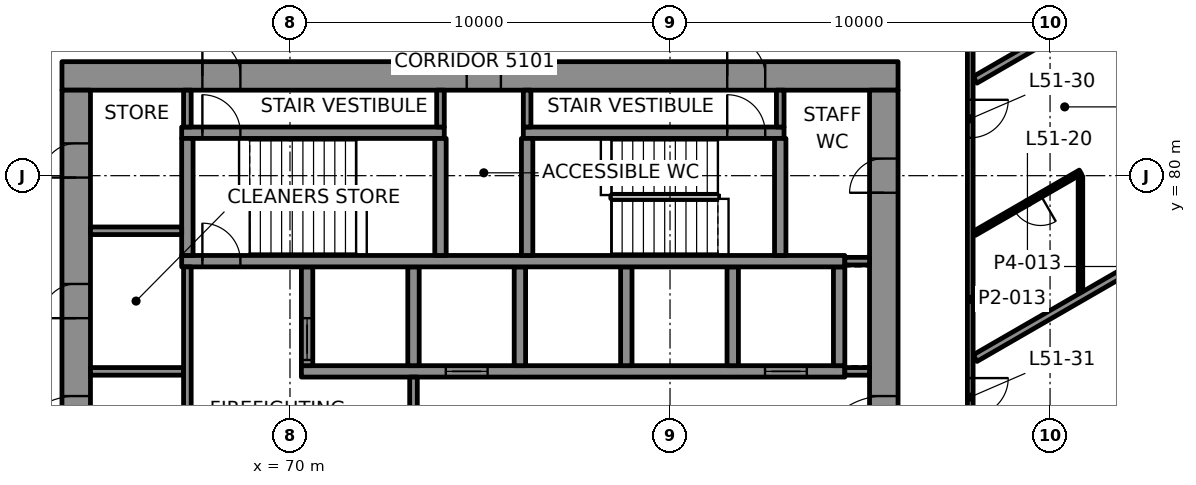
"""IFC4 building model, lengths in metres.
Left out: names, types, materials, properties, quantities, classifications, styles, units other than length and angle.
Written with IfcOpenShell. Run it as: python <this file> out.ifc"""

import sys

from ifc_helpers import new_model, si_unit, direction, frame, frame_2d, origin, place, context, subcontext, project, spatial, rectangle, extrude, element, fill, save


model = new_model("IFC4")
c1 = context("Model", 3, precision=1e-05, world=origin(), true_north=direction((0.0, 1.0)))
c2 = subcontext(c1, "Body", "Model", "MODEL_VIEW")
j1 = project(units=[si_unit("LENGTHUNIT", "METRE"), si_unit("PLANEANGLEUNIT", "RADIAN")], contexts=[c1])
p1 = place(None, origin())
s1 = spatial("IfcSite", under=j1, at=p1, CompositionType="ELEMENT")
p2 = place(p1, origin())
s2 = spatial("IfcBuilding", under=s1, at=p2, CompositionType="ELEMENT")
p3 = place(p2, frame((0.0, 0.0, 218.2)))
s3 = spatial("IfcBuildingStorey", under=s2, at=p3, CompositionType="ELEMENT", Elevation=218.2)
p4 = place(p3, frame((64.0, 82.625, 0.0), z_axis=(0.0, 0.0, 1.0), x_axis=(1.0, 0.0, 0.0)))
e1 = element("IfcWall", 1, at=p4, inside=s3, PredefinedType="SHEAR", context=c2, shape_type="SweptSolid", body=[
    extrude(rectangle(XDim=22.0, YDim=0.75, at=frame_2d((11.0, 0.0))), origin(), (0.0, 0.0, 1.0), 3.7),
])
p5 = place(p4, frame((3.695, 0.0, 0.0)))
e2 = element("IfcOpeningElement", 2, at=p5, cuts=e1, PredefinedType="OPENING", context=c2, shape_type="SweptSolid", body=[
    extrude(rectangle(XDim=1.0, YDim=2.1, at=frame_2d((0.5, 1.05))), frame((0.0, 0.385, 0.0), z_axis=(0.0, -1.0, 0.0), x_axis=(1.0, 0.0, 0.0)), (0.0, 0.0, 1.0), 0.77),
])
p6 = place(p4, frame((17.505, 0.0, 0.0)))
e3 = element("IfcOpeningElement", 3, at=p6, cuts=e1, PredefinedType="OPENING", context=c2, shape_type="SweptSolid", body=[
    extrude(rectangle(XDim=1.0, YDim=2.1, at=frame_2d((0.5, 1.05))), frame((0.0, 0.385, 0.0), z_axis=(0.0, -1.0, 0.0), x_axis=(1.0, 0.0, 0.0)), (0.0, 0.0, 1.0), 0.77),
])
p7 = place(p4, frame((10.65, 0.0, 0.0)))
e4 = element("IfcOpeningElement", 4, at=p7, cuts=e1, PredefinedType="OPENING", context=c2, shape_type="SweptSolid", body=[
    extrude(rectangle(XDim=0.9, YDim=2.1, at=frame_2d((0.45, 1.05))), frame((0.0, 0.385, 0.0), z_axis=(0.0, -1.0, 0.0), x_axis=(1.0, 0.0, 0.0)), (0.0, 0.0, 1.0), 0.77),
])
p8 = place(p3, frame((64.375, 67.75, 0.0), z_axis=(0.0, 0.0, 1.0), x_axis=(0.0, 1.0, 0.0)))
e5 = element("IfcWall", 5, at=p8, inside=s3, PredefinedType="SHEAR", context=c2, shape_type="SweptSolid", body=[
    extrude(rectangle(XDim=14.5, YDim=0.75, at=frame_2d((7.25, 0.0))), origin(), (0.0, 0.0, 1.0), 3.7),
])
p9 = place(p8, frame((4.65, 0.0, 0.0)))
e6 = element("IfcOpeningElement", 6, at=p9, cuts=e5, PredefinedType="OPENING", context=c2, shape_type="SweptSolid", body=[
    extrude(rectangle(XDim=1.8, YDim=2.1, at=frame_2d((0.9, 1.05))), frame((0.0, 0.385, 0.0), z_axis=(0.0, -1.0, 0.0), x_axis=(1.0, 0.0, 0.0)), (0.0, 0.0, 1.0), 0.77),
])
p10 = place(p8, frame((8.5, 0.0, 0.0)))
e7 = element("IfcOpeningElement", 7, at=p10, cuts=e5, PredefinedType="OPENING", context=c2, shape_type="SweptSolid", body=[
    extrude(rectangle(XDim=0.9, YDim=2.1, at=frame_2d((0.45, 1.05))), frame((0.0, 0.385, 0.0), z_axis=(0.0, -1.0, 0.0), x_axis=(1.0, 0.0, 0.0)), (0.0, 0.0, 1.0), 0.77),
])
p11 = place(p8, frame((12.2, 0.0, 0.0)))
e8 = element("IfcOpeningElement", 8, at=p11, cuts=e5, PredefinedType="OPENING", context=c2, shape_type="SweptSolid", body=[
    extrude(rectangle(XDim=0.9, YDim=2.1, at=frame_2d((0.45, 1.05))), frame((0.0, 0.385, 0.0), z_axis=(0.0, -1.0, 0.0), x_axis=(1.0, 0.0, 0.0)), (0.0, 0.0, 1.0), 0.77),
])
p12 = place(p3, frame((85.625, 67.75, 0.0), z_axis=(0.0, 0.0, 1.0), x_axis=(0.0, 1.0, 0.0)))
e9 = element("IfcWall", 9, at=p12, inside=s3, PredefinedType="SHEAR", context=c2, shape_type="SweptSolid", body=[
    extrude(rectangle(XDim=14.5, YDim=0.75, at=frame_2d((7.25, 0.0))), origin(), (0.0, 0.0, 1.0), 3.7),
])
p13 = place(p12, frame((4.65, 0.0, 0.0)))
e10 = element("IfcOpeningElement", 10, at=p13, cuts=e9, PredefinedType="OPENING", context=c2, shape_type="SweptSolid", body=[
    extrude(rectangle(XDim=1.8, YDim=2.1, at=frame_2d((0.9, 1.05))), frame((0.0, 0.385, 0.0), z_axis=(0.0, -1.0, 0.0), x_axis=(1.0, 0.0, 0.0)), (0.0, 0.0, 1.0), 0.77),
])
p14 = place(p12, frame((11.8, 0.0, 0.0)))
e11 = element("IfcOpeningElement", 11, at=p14, cuts=e9, PredefinedType="OPENING", context=c2, shape_type="SweptSolid", body=[
    extrude(rectangle(XDim=0.9, YDim=2.1, at=frame_2d((0.45, 1.05))), frame((0.0, 0.385, 0.0), z_axis=(0.0, -1.0, 0.0), x_axis=(1.0, 0.0, 0.0)), (0.0, 0.0, 1.0), 0.77),
])
p15 = place(p3, frame((70.3, 74.85, 0.0), z_axis=(0.0, 0.0, 1.0), x_axis=(1.0, 0.0, 0.0)))
e12 = element("IfcWall", 12, at=p15, inside=s3, PredefinedType="SHEAR", context=c2, shape_type="SweptSolid", body=[
    extrude(rectangle(XDim=14.3, YDim=0.3, at=frame_2d((7.15, 0.0))), origin(), (0.0, 0.0, 1.0), 3.7),
])
p16 = place(p15, frame((3.8, 0.0, 0.0)))
e13 = element("IfcOpeningElement", 13, at=p16, cuts=e12, PredefinedType="OPENING", context=c2, shape_type="SweptSolid", body=[
    extrude(rectangle(XDim=1.1, YDim=2.1, at=frame_2d((0.55, 1.05))), frame((0.0, 0.16, 0.0), z_axis=(0.0, -1.0, 0.0), x_axis=(1.0, 0.0, 0.0)), (0.0, 0.0, 1.0), 0.32),
])
p17 = place(p15, frame((12.2, 0.0, 0.0)))
e14 = element("IfcOpeningElement", 14, at=p17, cuts=e12, PredefinedType="OPENING", context=c2, shape_type="SweptSolid", body=[
    extrude(rectangle(XDim=1.1, YDim=2.1, at=frame_2d((0.55, 1.05))), frame((0.0, 0.16, 0.0), z_axis=(0.0, -1.0, 0.0), x_axis=(1.0, 0.0, 0.0)), (0.0, 0.0, 1.0), 0.32),
])
p18 = place(p3, frame((70.45, 75.0, 0.0), z_axis=(0.0, 0.0, 1.0), x_axis=(0.0, 1.0, 0.0)))
e15 = element("IfcWall", 15, at=p18, inside=s3, PredefinedType="SHEAR", context=c2, shape_type="SweptSolid", body=[
    extrude(rectangle(XDim=2.6, YDim=0.3, at=frame_2d((1.3, 0.0))), origin(), (0.0, 0.0, 1.0), 3.7),
])
p19 = place(p18, frame((0.15, 0.0, 0.0)))
e16 = element("IfcOpeningElement", 16, at=p19, cuts=e15, PredefinedType="OPENING", context=c2, shape_type="SweptSolid", body=[
    extrude(rectangle(XDim=1.1, YDim=2.1, at=frame_2d((0.55, 1.05))), frame((0.0, 0.16, 0.0), z_axis=(0.0, -1.0, 0.0), x_axis=(1.0, 0.0, 0.0)), (0.0, 0.0, 1.0), 0.32),
])
for number, where, z_axis, x_axis in (
    (17, (73.25, 75.0, 0.0), (0.0, 0.0, 1.0), (0.0, 1.0, 0.0)),
    (18, (76.05, 75.0, 0.0), (0.0, 0.0, 1.0), (0.0, 1.0, 0.0)),
    (19, (78.85, 75.0, 0.0), (0.0, 0.0, 1.0), (0.0, 1.0, 0.0)),
    (20, (81.65, 75.0, 0.0), (0.0, 0.0, 1.0), (0.0, 1.0, 0.0)),
    (21, (84.45, 75.0, 0.0), (0.0, 0.0, 1.0), (0.0, 1.0, 0.0)),
):
    element("IfcWall", number, at=place(p3, frame(where, z_axis=z_axis, x_axis=x_axis)), inside=s3, PredefinedType="SHEAR", context=c2, shape_type="SweptSolid", body=[
        extrude(rectangle(XDim=2.6, YDim=0.3, at=frame_2d((1.3, 0.0))), origin(), (0.0, 0.0, 1.0), 3.7),
    ])
p20 = place(p3, frame((67.15, 77.75, 0.0), z_axis=(0.0, 0.0, 1.0), x_axis=(1.0, 0.0, 0.0)))
e22 = element("IfcWall", 22, at=p20, inside=s3, PredefinedType="SHEAR", context=c2, shape_type="SweptSolid", body=[
    extrude(rectangle(XDim=17.45, YDim=0.3, at=frame_2d((8.725, 0.0))), origin(), (0.0, 0.0, 1.0), 3.7),
])
p21 = place(p20, frame((0.545, 0.0, 0.0)))
e23 = element("IfcOpeningElement", 23, at=p21, cuts=e22, PredefinedType="OPENING", context=c2, shape_type="SweptSolid", body=[
    extrude(rectangle(XDim=1.0, YDim=2.1, at=frame_2d((0.5, 1.05))), frame((0.0, 0.16, 0.0), z_axis=(0.0, -1.0, 0.0), x_axis=(1.0, 0.0, 0.0)), (0.0, 0.0, 1.0), 0.32),
])
p22 = place(p3, frame((67.15, 81.13, 0.0), z_axis=(0.0, 0.0, 1.0), x_axis=(1.0, 0.0, 0.0)))
e24 = element("IfcWall", 24, at=p22, inside=s3, PredefinedType="SHEAR", context=c2, shape_type="SweptSolid", body=[
    extrude(rectangle(XDim=6.91, YDim=0.3, at=frame_2d((3.455, 0.0))), origin(), (0.0, 0.0, 1.0), 3.7),
])
p23 = place(p22, frame((0.545, 0.0, 0.0)))
e25 = element("IfcOpeningElement", 25, at=p23, cuts=e24, PredefinedType="OPENING", context=c2, shape_type="SweptSolid", body=[
    extrude(rectangle(XDim=1.0, YDim=2.1, at=frame_2d((0.5, 1.05))), frame((0.0, 0.16, 0.0), z_axis=(0.0, -1.0, 0.0), x_axis=(1.0, 0.0, 0.0)), (0.0, 0.0, 1.0), 0.32),
])
p24 = place(p3, frame((76.14, 81.13, 0.0), z_axis=(0.0, 0.0, 1.0), x_axis=(1.0, 0.0, 0.0)))
e26 = element("IfcWall", 26, at=p24, inside=s3, PredefinedType="SHEAR", context=c2, shape_type="SweptSolid", body=[
    extrude(rectangle(XDim=6.86, YDim=0.3, at=frame_2d((3.43, 0.0))), origin(), (0.0, 0.0, 1.0), 3.7),
])
p25 = place(p24, frame((5.365, 0.0, 0.0)))
e27 = element("IfcOpeningElement", 27, at=p25, cuts=e26, PredefinedType="OPENING", context=c2, shape_type="SweptSolid", body=[
    extrude(rectangle(XDim=1.0, YDim=2.1, at=frame_2d((0.5, 1.05))), frame((0.0, 0.16, 0.0), z_axis=(0.0, -1.0, 0.0), x_axis=(1.0, 0.0, 0.0)), (0.0, 0.0, 1.0), 0.32),
])
for number, where, z_axis, x_axis in (
    (28, (67.3, 77.9, 0.0), (0.0, 0.0, 1.0), (0.0, 1.0, 0.0)),
    (29, (73.96, 77.9, 0.0), (0.0, 0.0, 1.0), (0.0, 1.0, 0.0)),
    (30, (76.24, 77.9, 0.0), (0.0, 0.0, 1.0), (0.0, 1.0, 0.0)),
    (31, (82.9, 77.9, 0.0), (0.0, 0.0, 1.0), (0.0, 1.0, 0.0)),
):
    element("IfcWall", number, at=place(p3, frame(where, z_axis=z_axis, x_axis=x_axis)), inside=s3, PredefinedType="SHEAR", context=c2, shape_type="SweptSolid", body=[
        extrude(rectangle(XDim=3.08, YDim=0.3, at=frame_2d((1.54, 0.0))), origin(), (0.0, 0.0, 1.0), 3.7),
    ])
p26 = place(p3, frame((88.027, 75.198, 0.0), z_axis=(0.0, 0.0, 1.0), x_axis=(0.866029625778, 0.499992687221, 0.0)))
e32 = element("IfcWall", 32, at=p26, inside=s3, PredefinedType="PARTITIONING", context=c2, shape_type="SweptSolid", body=[
    extrude(rectangle(XDim=7.481, YDim=0.2, at=frame_2d((3.741, 0.0))), origin(), (0.0, 0.0, 1.0), 3.022),
])
p27 = place(p3, frame((90.8, 80.095, 0.0), z_axis=(0.0, 0.0, 1.0), x_axis=(-0.866029130051, -0.499993545862, 0.0)))
e33 = element("IfcWall", 33, at=p27, inside=s3, PredefinedType="PARTITIONING", context=c2, shape_type="SweptSolid", body=[
    extrude(rectangle(XDim=3.222, YDim=0.12, at=frame_2d((1.611, 0.0))), origin(), (0.0, 0.0, 1.0), 3.1),
])
p28 = place(p27, frame((1.211, 0.0, 0.0)))
e34 = element("IfcOpeningElement", 34, at=p28, cuts=e33, PredefinedType="OPENING", context=c2, shape_type="SweptSolid", body=[
    extrude(rectangle(XDim=0.8, YDim=2.1, at=frame_2d((0.4, 1.05))), frame((0.0, 0.07, 0.0), z_axis=(0.0, -1.0, 0.0), x_axis=(1.0, 0.0, 0.0)), (0.0, 0.0, 1.0), 0.14),
])
p29 = place(p3, frame((88.027, 82.521, 0.0), z_axis=(0.0, 0.0, 1.0), x_axis=(0.866032292145, 0.49998806882, 0.0)))
e35 = element("IfcWall", 35, at=p29, inside=s3, PredefinedType="PARTITIONING", context=c2, shape_type="SweptSolid", body=[
    extrude(rectangle(XDim=2.36, YDim=0.2, at=frame_2d((1.18, 0.0))), origin(), (0.0, 0.0, 1.0), 3.1),
])
p30 = place(p3, frame((90.8, 76.955, 0.0), z_axis=(0.0, 0.0, 1.0), x_axis=(0.0, 1.0, 0.0)))
e36 = element("IfcWall", 36, at=p30, inside=s3, PredefinedType="PARTITIONING", context=c2, shape_type="SweptSolid", body=[
    extrude(rectangle(XDim=3.031, YDim=0.12, at=frame_2d((1.515, 0.0))), origin(), (0.0, 0.0, 1.0), 3.1),
])
p31 = place(p3, frame((87.9, 84.9, 0.0), z_axis=(0.0, 0.0, 1.0), x_axis=(0.0, -1.0, 0.0)))
e37 = element("IfcWall", 37, at=p31, inside=s3, PredefinedType="PARTITIONING", context=c2, shape_type="SweptSolid", body=[
    extrude(rectangle(XDim=16.309, YDim=0.15, at=frame_2d((8.154, 0.0))), origin(), (0.0, 0.0, 1.0), 3.1),
])
p32 = place(p31, frame((2.904, 0.0, 0.0)))
e38 = element("IfcOpeningElement", 38, at=p32, cuts=e37, PredefinedType="OPENING", context=c2, shape_type="SweptSolid", body=[
    extrude(rectangle(XDim=1.0, YDim=2.1, at=frame_2d((0.5, 1.05))), frame((0.0, 0.085, 0.0), z_axis=(0.0, -1.0, 0.0), x_axis=(1.0, 0.0, 0.0)), (0.0, 0.0, 1.0), 0.17),
])
p33 = place(p31, frame((10.227, 0.0, 0.0)))
e39 = element("IfcOpeningElement", 39, at=p33, cuts=e37, PredefinedType="OPENING", context=c2, shape_type="SweptSolid", body=[
    extrude(rectangle(XDim=1.0, YDim=2.1, at=frame_2d((0.5, 1.05))), frame((0.0, 0.085, 0.0), z_axis=(0.0, -1.0, 0.0), x_axis=(1.0, 0.0, 0.0)), (0.0, 0.0, 1.0), 0.17),
])
p34 = place(p3, frame((64.75, 74.85, 0.0), z_axis=(0.0, 0.0, 1.0), x_axis=(1.0, 0.0, 0.0)))
e40 = element("IfcWall", 40, at=p34, inside=s3, PredefinedType="PARTITIONING", context=c2, shape_type="SweptSolid", body=[
    extrude(rectangle(XDim=2.45, YDim=0.2, at=frame_2d((1.225, 0.0))), origin(), (0.0, 0.0, 1.0), 3.7),
])
for number, where, z_axis, x_axis in (
    (41, (84.6, 74.85, 0.0), (0.0, 0.0, 1.0), (1.0, 0.0, 0.0)),
    (42, (84.6, 77.75, 0.0), (0.0, 0.0, 1.0), (1.0, 0.0, 0.0)),
):
    element("IfcWall", number, at=place(p3, frame(where, z_axis=z_axis, x_axis=x_axis)), inside=s3, PredefinedType="PARTITIONING", context=c2, shape_type="SweptSolid", body=[
        extrude(rectangle(XDim=0.65, YDim=0.2, at=frame_2d((0.325, 0.0))), origin(), (0.0, 0.0, 1.0), 3.7),
    ])
p35 = place(p3, frame((64.75, 78.55, 0.0), z_axis=(0.0, 0.0, 1.0), x_axis=(1.0, 0.0, 0.0)))
e43 = element("IfcWall", 43, at=p35, inside=s3, PredefinedType="PARTITIONING", context=c2, shape_type="SweptSolid", body=[
    extrude(rectangle(XDim=2.4, YDim=0.2, at=frame_2d((1.2, 0.0))), origin(), (0.0, 0.0, 1.0), 3.7),
])
p36 = place(p3, frame((67.3, 71.85, 0.0), z_axis=(0.0, 0.0, 1.0), x_axis=(0.0, 1.0, 0.0)))
e44 = element("IfcWall", 44, at=p36, inside=s3, PredefinedType="PARTITIONING", context=c2, shape_type="SweptSolid", body=[
    extrude(rectangle(XDim=5.75, YDim=0.2, at=frame_2d((2.875, 0.0))), origin(), (0.0, 0.0, 1.0), 3.7),
])
p37 = place(p36, frame((0.85, 0.0, 0.0)))
e45 = element("IfcOpeningElement", 45, at=p37, cuts=e44, PredefinedType="OPENING", context=c2, shape_type="SweptSolid", body=[
    extrude(rectangle(XDim=1.2, YDim=2.1, at=frame_2d((0.6, 1.05))), frame((0.0, 0.11, 0.0), z_axis=(0.0, -1.0, 0.0), x_axis=(1.0, 0.0, 0.0)), (0.0, 0.0, 1.0), 0.22),
])
p38 = place(p3, frame((67.3, 81.28, 0.0), z_axis=(0.0, 0.0, 1.0), x_axis=(0.0, 1.0, 0.0)))
e46 = element("IfcWall", 46, at=p38, inside=s3, PredefinedType="PARTITIONING", context=c2, shape_type="SweptSolid", body=[
    extrude(rectangle(XDim=0.97, YDim=0.2, at=frame_2d((0.485, 0.0))), origin(), (0.0, 0.0, 1.0), 3.7),
])
p39 = place(p3, frame((73.25, 71.9, 0.0), z_axis=(0.0, 0.0, 1.0), x_axis=(0.0, 1.0, 0.0)))
e47 = element("IfcWall", 47, at=p39, inside=s3, PredefinedType="PARTITIONING", context=c2, shape_type="SweptSolid", body=[
    extrude(rectangle(XDim=2.8, YDim=0.2, at=frame_2d((1.4, 0.0))), origin(), (0.0, 0.0, 1.0), 3.7),
])
p40 = place(p39, frame((0.8, 0.0, 0.0)))
e48 = element("IfcOpeningElement", 48, at=p40, cuts=e47, PredefinedType="OPENING", context=c2, shape_type="SweptSolid", body=[
    extrude(rectangle(XDim=1.2, YDim=2.1, at=frame_2d((0.6, 1.05))), frame((0.0, 0.11, 0.0), z_axis=(0.0, -1.0, 0.0), x_axis=(1.0, 0.0, 0.0)), (0.0, 0.0, 1.0), 0.22),
])
for number, where, z_axis, x_axis in (
    (49, (73.96, 81.28, 0.0), (0.0, 0.0, 1.0), (0.0, 1.0, 0.0)),
    (50, (76.24, 81.28, 0.0), (0.0, 0.0, 1.0), (0.0, 1.0, 0.0)),
    (51, (82.9, 81.28, 0.0), (0.0, 0.0, 1.0), (0.0, 1.0, 0.0)),
):
    element("IfcWall", number, at=place(p3, frame(where, z_axis=z_axis, x_axis=x_axis)), inside=s3, PredefinedType="PARTITIONING", context=c2, shape_type="SweptSolid", body=[
        extrude(rectangle(XDim=0.97, YDim=0.2, at=frame_2d((0.485, 0.0))), origin(), (0.0, 0.0, 1.0), 3.7),
    ])
p41 = place(p28, origin())
e52 = element("IfcDoor", 52, at=p41, inside=s3, OperationType="SINGLE_SWING_RIGHT", PredefinedType="DOOR", context=c2, shape_type="SweptSolid", body=[
    extrude(rectangle(XDim=0.8, YDim=2.1, at=frame_2d((0.4, 1.05))), frame((0.0, 0.025, 0.0), z_axis=(0.0, -1.0, 0.0), x_axis=(1.0, 0.0, 0.0)), (0.0, 0.0, 1.0), 0.05),
])
fill(e34, e52)
p42 = place(p32, origin())
e53 = element("IfcDoor", 53, at=p42, inside=s3, OperationType="SINGLE_SWING_LEFT", PredefinedType="DOOR", context=c2, shape_type="SweptSolid", body=[
    extrude(rectangle(XDim=1.0, YDim=2.1, at=frame_2d((0.5, 1.05))), frame((0.0, 0.025, 0.0), z_axis=(0.0, -1.0, 0.0), x_axis=(1.0, 0.0, 0.0)), (0.0, 0.0, 1.0), 0.05),
])
fill(e38, e53)
p43 = place(p33, origin())
e54 = element("IfcDoor", 54, at=p43, inside=s3, OperationType="SINGLE_SWING_LEFT", PredefinedType="DOOR", context=c2, shape_type="SweptSolid", body=[
    extrude(rectangle(XDim=1.0, YDim=2.1, at=frame_2d((0.5, 1.05))), frame((0.0, 0.025, 0.0), z_axis=(0.0, -1.0, 0.0), x_axis=(1.0, 0.0, 0.0)), (0.0, 0.0, 1.0), 0.05),
])
fill(e39, e54)
p44 = place(p19, origin())
e55 = element("IfcDoor", 55, at=p44, inside=s3, OperationType="DOUBLE_DOOR_SLIDING", PredefinedType="DOOR", context=c2, shape_type="SweptSolid", body=[
    extrude(rectangle(XDim=1.1, YDim=2.1, at=frame_2d((0.55, 1.05))), frame((0.0, 0.025, 0.0), z_axis=(0.0, -1.0, 0.0), x_axis=(1.0, 0.0, 0.0)), (0.0, 0.0, 1.0), 0.05),
])
fill(e16, e55)
p45 = place(p16, origin())
e56 = element("IfcDoor", 56, at=p45, inside=s3, OperationType="DOUBLE_DOOR_SLIDING", PredefinedType="DOOR", context=c2, shape_type="SweptSolid", body=[
    extrude(rectangle(XDim=1.1, YDim=2.1, at=frame_2d((0.55, 1.05))), frame((0.0, 0.025, 0.0), z_axis=(0.0, -1.0, 0.0), x_axis=(1.0, 0.0, 0.0)), (0.0, 0.0, 1.0), 0.05),
])
fill(e13, e56)
p46 = place(p17, origin())
e57 = element("IfcDoor", 57, at=p46, inside=s3, OperationType="DOUBLE_DOOR_SLIDING", PredefinedType="DOOR", context=c2, shape_type="SweptSolid", body=[
    extrude(rectangle(XDim=1.1, YDim=2.1, at=frame_2d((0.55, 1.05))), frame((0.0, 0.025, 0.0), z_axis=(0.0, -1.0, 0.0), x_axis=(1.0, 0.0, 0.0)), (0.0, 0.0, 1.0), 0.05),
])
fill(e14, e57)
p47 = place(p21, origin())
e58 = element("IfcDoor", 58, at=p47, inside=s3, OperationType="SINGLE_SWING_LEFT", PredefinedType="DOOR", context=c2, shape_type="SweptSolid", body=[
    extrude(rectangle(XDim=1.0, YDim=2.1, at=frame_2d((0.5, 1.05))), frame((0.0, 0.025, 0.0), z_axis=(0.0, -1.0, 0.0), x_axis=(1.0, 0.0, 0.0)), (0.0, 0.0, 1.0), 0.05),
])
fill(e23, e58)
p48 = place(p23, origin())
e59 = element("IfcDoor", 59, at=p48, inside=s3, OperationType="SINGLE_SWING_RIGHT", PredefinedType="DOOR", context=c2, shape_type="SweptSolid", body=[
    extrude(rectangle(XDim=1.0, YDim=2.1, at=frame_2d((0.5, 1.05))), frame((0.0, 0.025, 0.0), z_axis=(0.0, -1.0, 0.0), x_axis=(1.0, 0.0, 0.0)), (0.0, 0.0, 1.0), 0.05),
])
fill(e25, e59)
p49 = place(p5, origin())
e60 = element("IfcDoor", 60, at=p49, inside=s3, OperationType="SINGLE_SWING_LEFT", PredefinedType="DOOR", context=c2, shape_type="SweptSolid", body=[
    extrude(rectangle(XDim=1.0, YDim=2.1, at=frame_2d((0.5, 1.05))), frame((0.0, 0.095, 0.0), z_axis=(0.0, -1.0, 0.0), x_axis=(1.0, 0.0, 0.0)), (0.0, 0.0, 1.0), 0.19),
])
fill(e2, e60)
p50 = place(p25, origin())
e61 = element("IfcDoor", 61, at=p50, inside=s3, OperationType="SINGLE_SWING_RIGHT", PredefinedType="DOOR", context=c2, shape_type="SweptSolid", body=[
    extrude(rectangle(XDim=1.0, YDim=2.1, at=frame_2d((0.5, 1.05))), frame((0.0, 0.025, 0.0), z_axis=(0.0, -1.0, 0.0), x_axis=(1.0, 0.0, 0.0)), (0.0, 0.0, 1.0), 0.05),
])
fill(e27, e61)
p51 = place(p6, origin())
e62 = element("IfcDoor", 62, at=p51, inside=s3, OperationType="SINGLE_SWING_LEFT", PredefinedType="DOOR", context=c2, shape_type="SweptSolid", body=[
    extrude(rectangle(XDim=1.0, YDim=2.1, at=frame_2d((0.5, 1.05))), frame((0.0, 0.095, 0.0), z_axis=(0.0, -1.0, 0.0), x_axis=(1.0, 0.0, 0.0)), (0.0, 0.0, 1.0), 0.19),
])
fill(e3, e62)
p52 = place(p9, origin())
e63 = element("IfcDoor", 63, at=p52, inside=s3, OperationType="SINGLE_SWING_LEFT", PredefinedType="DOOR", context=c2, shape_type="SweptSolid", body=[
    extrude(rectangle(XDim=1.8, YDim=2.1, at=frame_2d((0.9, 1.05))), frame((0.0, 0.095, 0.0), z_axis=(0.0, -1.0, 0.0), x_axis=(1.0, 0.0, 0.0)), (0.0, 0.0, 1.0), 0.19),
])
fill(e6, e63)
p53 = place(p13, origin())
e64 = element("IfcDoor", 64, at=p53, inside=s3, OperationType="SINGLE_SWING_RIGHT", PredefinedType="DOOR", context=c2, shape_type="SweptSolid", body=[
    extrude(rectangle(XDim=1.8, YDim=2.1, at=frame_2d((0.9, 1.05))), frame((0.0, 0.095, 0.0), z_axis=(0.0, -1.0, 0.0), x_axis=(1.0, 0.0, 0.0)), (0.0, 0.0, 1.0), 0.19),
])
fill(e10, e64)
p54 = place(p10, origin())
e65 = element("IfcDoor", 65, at=p54, inside=s3, OperationType="SINGLE_SWING_RIGHT", PredefinedType="DOOR", context=c2, shape_type="SweptSolid", body=[
    extrude(rectangle(XDim=0.9, YDim=2.1, at=frame_2d((0.45, 1.05))), frame((0.0, 0.095, 0.0), z_axis=(0.0, -1.0, 0.0), x_axis=(1.0, 0.0, 0.0)), (0.0, 0.0, 1.0), 0.19),
])
fill(e7, e65)
p55 = place(p11, origin())
e66 = element("IfcDoor", 66, at=p55, inside=s3, OperationType="SINGLE_SWING_LEFT", PredefinedType="DOOR", context=c2, shape_type="SweptSolid", body=[
    extrude(rectangle(XDim=0.9, YDim=2.1, at=frame_2d((0.45, 1.05))), frame((0.0, 0.095, 0.0), z_axis=(0.0, -1.0, 0.0), x_axis=(1.0, 0.0, 0.0)), (0.0, 0.0, 1.0), 0.19),
])
fill(e8, e66)
p56 = place(p7, origin())
e67 = element("IfcDoor", 67, at=p56, inside=s3, OperationType="SINGLE_SWING_RIGHT", PredefinedType="DOOR", context=c2, shape_type="SweptSolid", body=[
    extrude(rectangle(XDim=0.9, YDim=2.1, at=frame_2d((0.45, 1.05))), frame((0.0, 0.095, 0.0), z_axis=(0.0, -1.0, 0.0), x_axis=(1.0, 0.0, 0.0)), (0.0, 0.0, 1.0), 0.19),
])
fill(e4, e67)
p57 = place(p14, origin())
e68 = element("IfcDoor", 68, at=p57, inside=s3, OperationType="SINGLE_SWING_LEFT", PredefinedType="DOOR", context=c2, shape_type="SweptSolid", body=[
    extrude(rectangle(XDim=0.9, YDim=2.1, at=frame_2d((0.45, 1.05))), frame((0.0, 0.095, 0.0), z_axis=(0.0, -1.0, 0.0), x_axis=(1.0, 0.0, 0.0)), (0.0, 0.0, 1.0), 0.19),
])
fill(e11, e68)
save(model, sys.argv[1])
